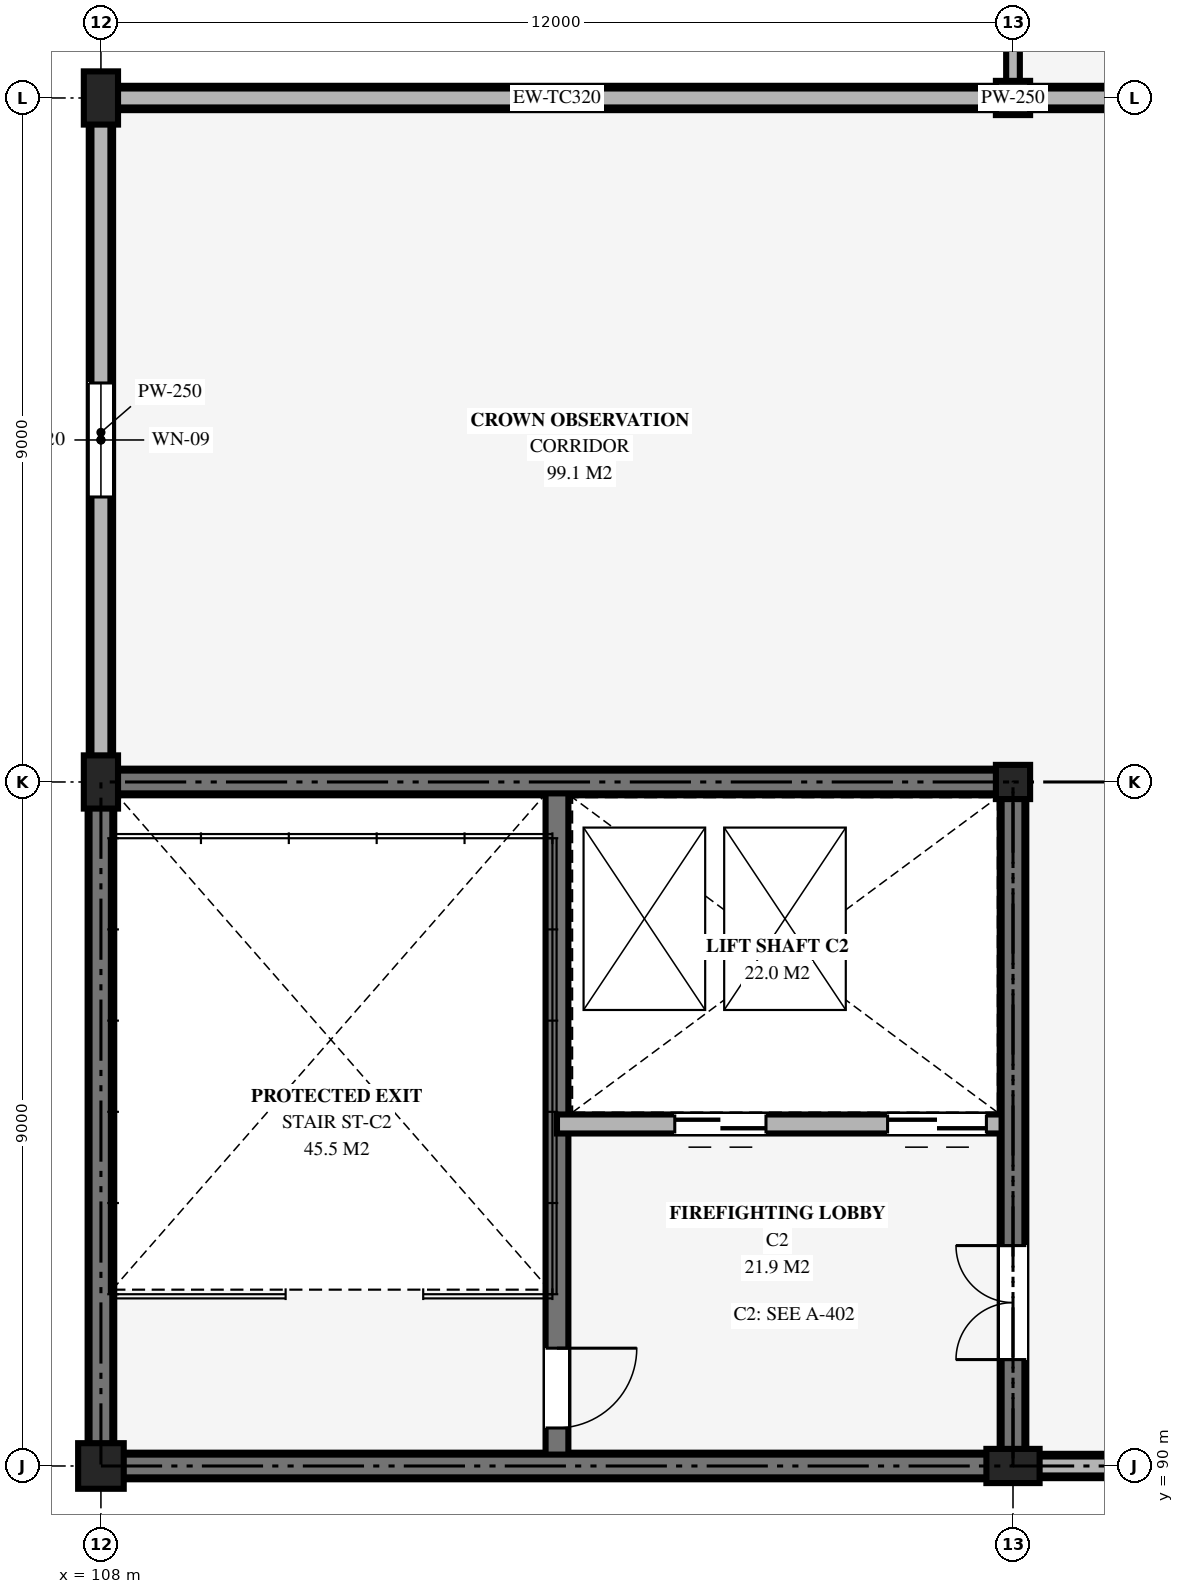
"""IFC4 building model, lengths in metres.
Left out: names, types, materials, properties, quantities, classifications, styles, units other than length and angle.
Written with IfcOpenShell. Run it as: python <this file> out.ifc"""

import sys

from ifc_helpers import new_model, si_unit, direction, frame, frame_2d, origin, origin_2d, place, context, subcontext, project, spatial, rectangle, circle, extrude, element, fill, save


model = new_model("IFC4")
c1 = context("Model", 3, precision=1e-05, world=origin(), true_north=direction((0.0, 1.0)))
c2 = subcontext(c1, "Body", "Model", "MODEL_VIEW")
j1 = project(units=[si_unit("LENGTHUNIT", "METRE"), si_unit("PLANEANGLEUNIT", "RADIAN")], contexts=[c1])
p1 = place(None, origin())
s1 = spatial("IfcSite", under=j1, at=p1, CompositionType="ELEMENT")
p2 = place(p1, origin())
s2 = spatial("IfcBuilding", under=s1, at=p2, CompositionType="ELEMENT")
p3 = place(p2, frame((0.0, 0.0, 23.7)))
s3 = spatial("IfcBuildingStorey", under=s2, at=p3, CompositionType="ELEMENT", Elevation=23.7)
p4 = place(p3, frame((108.0, 90.0, 0.0), z_axis=(0.0, 0.0, 1.0), x_axis=(1.0, 0.0, 0.0)))
e1 = element("IfcColumn", 1, at=p4, inside=s3, PredefinedType="COLUMN", context=c2, shape_type="SweptSolid", body=[
    extrude(circle(Radius=0.3, at=origin_2d()), origin(), (0.0, 0.0, 1.0), 4.04),
])
for number, where, z_axis, x_axis in (
    (2, (108.0, 99.0, 0.0), (0.0, 0.0, 1.0), (1.0, 0.0, 0.0)),
    (3, (108.0, 108.0, 0.0), (0.0, 0.0, 1.0), (1.0, 0.0, 0.0)),
    (4, (120.0, 90.0, 0.0), (0.0, 0.0, 1.0), (0.0, 1.0, 0.0)),
):
    element("IfcColumn", number, at=place(p3, frame(where, z_axis=z_axis, x_axis=x_axis)), inside=s3, PredefinedType="PILASTER", context=c2, shape_type="SweptSolid", body=[
        extrude(rectangle(XDim=0.45, YDim=0.7, at=origin_2d()), origin(), (0.0, 0.0, 1.0), 4.04),
    ])
for number, where, z_axis, x_axis in (
    (5, (120.0, 99.0, 0.0), (0.0, 0.0, 1.0), (1.0, 0.0, 0.0)),
    (6, (120.0, 108.0, 0.0), (0.0, 0.0, 1.0), (1.0, 0.0, 0.0)),
):
    element("IfcColumn", number, at=place(p3, frame(where, z_axis=z_axis, x_axis=x_axis)), inside=s3, PredefinedType="COLUMN", context=c2, shape_type="SweptSolid", body=[
        extrude(rectangle(XDim=0.45, YDim=0.45, at=origin_2d()), origin(), (0.0, 0.0, 1.0), 4.04),
    ])
p5 = place(p3, frame((131.5, 90.0, 0.0), z_axis=(0.0, 0.0, 1.0), x_axis=(-1.0, 0.0, 0.0)))
e7 = element("IfcWall", 7, at=p5, inside=s3, PredefinedType="SOLIDWALL", context=c2, shape_type="SweptSolid", body=[
    extrude(rectangle(XDim=11.15, YDim=0.32, at=frame_2d((5.575, 0.0))), origin(), (0.0, 0.0, 1.0), 3.98),
])
p6 = place(p5, frame((1.6, 0.0, 1.0)))
e8 = element("IfcOpeningElement", 8, at=p6, cuts=e7, PredefinedType="OPENING", context=c2, shape_type="SweptSolid", body=[
    extrude(rectangle(XDim=1.8, YDim=2.2, at=frame_2d((0.9, 1.1))), frame((0.0, 0.17, 0.0), z_axis=(0.0, -1.0, 0.0), x_axis=(1.0, 0.0, 0.0)), (0.0, 0.0, 1.0), 0.34),
])
p7 = place(p3, frame((108.0, 107.65, 0.0), z_axis=(0.0, 0.0, 1.0), x_axis=(0.0, -1.0, 0.0)))
e9 = element("IfcWall", 9, at=p7, inside=s3, PredefinedType="SOLIDWALL", context=c2, shape_type="SweptSolid", body=[
    extrude(rectangle(XDim=8.3, YDim=0.32, at=frame_2d((4.15, 0.0))), origin(), (0.0, 0.0, 1.0), 3.98),
])
p8 = place(p7, frame((3.4, 0.0, 1.0)))
e10 = element("IfcOpeningElement", 10, at=p8, cuts=e9, PredefinedType="OPENING", context=c2, shape_type="SweptSolid", body=[
    extrude(rectangle(XDim=1.5, YDim=1.8, at=frame_2d((0.75, 0.9))), frame((0.0, 0.17, 0.0), z_axis=(0.0, -1.0, 0.0), x_axis=(1.0, 0.0, 0.0)), (0.0, 0.0, 1.0), 0.34),
])
for number, where, z_axis, x_axis in (
    (11, (108.225, 108.0, 0.0), (0.0, 0.0, 1.0), (1.0, 0.0, 0.0)),
    (12, (120.225, 108.0, 0.0), (0.0, 0.0, 1.0), (1.0, 0.0, 0.0)),
):
    element("IfcWall", number, at=place(p3, frame(where, z_axis=z_axis, x_axis=x_axis)), inside=s3, PredefinedType="SOLIDWALL", context=c2, shape_type="SweptSolid", body=[
        extrude(rectangle(XDim=11.55, YDim=0.32, at=frame_2d((5.775, 0.0))), origin(), (0.0, 0.0, 1.0), 3.98),
    ])
p9 = place(p3, frame((120.0, 108.0, 0.0), z_axis=(0.0, 0.0, 1.0), x_axis=(0.0, 1.0, 0.0)))
e13 = element("IfcWall", 13, at=p9, inside=s3, PredefinedType="PARAPET", context=c2, shape_type="SweptSolid", body=[
    extrude(rectangle(XDim=18.0, YDim=0.18, at=frame_2d((9.0, 0.0))), origin(), (0.0, 0.0, 1.0), 1.15),
])
p10 = place(p3, frame((120.2, 90.0, 4.2), z_axis=(0.0, 0.0, 1.0), x_axis=(1.0, 0.0, 0.0)))
e14 = element("IfcWall", 14, at=p10, inside=s3, PredefinedType="PARAPET", context=c2, shape_type="SweptSolid", body=[
    extrude(rectangle(XDim=51.8, YDim=0.25, at=frame_2d((25.9, 0.0))), origin(), (0.0, 0.0, 1.0), 1.35),
])
p11 = place(p3, frame((132.0, 108.0, 4.2), z_axis=(0.0, 0.0, 1.0), x_axis=(-1.0, 0.0, 0.0)))
e15 = element("IfcWall", 15, at=p11, inside=s3, PredefinedType="PARAPET", context=c2, shape_type="SweptSolid", body=[
    extrude(rectangle(XDim=24.0, YDim=0.25, at=frame_2d((12.0, 0.0))), origin(), (0.0, 0.0, 1.0), 1.35),
])
p12 = place(p3, frame((108.0, 108.0, 4.2), z_axis=(0.0, 0.0, 1.0), x_axis=(0.0, -1.0, 0.0)))
e16 = element("IfcWall", 16, at=p12, inside=s3, PredefinedType="PARAPET", context=c2, shape_type="SweptSolid", body=[
    extrude(rectangle(XDim=8.8, YDim=0.25, at=frame_2d((4.4, 0.0))), origin(), (0.0, 0.0, 1.0), 1.35),
])
for number, where, z_axis, x_axis in (
    (17, (108.0, 90.0, 0.0), (0.0, 0.0, 1.0), (1.0, 0.0, 0.0)),
    (18, (108.0, 99.0, 0.0), (0.0, 0.0, 1.0), (1.0, 0.0, 0.0)),
):
    element("IfcWall", number, at=place(p3, frame(where, z_axis=z_axis, x_axis=x_axis)), inside=s3, PredefinedType="SHEAR", context=c2, shape_type="SweptSolid", body=[
        extrude(rectangle(XDim=12.0, YDim=0.35, at=frame_2d((6.0, 0.0))), origin(), (0.0, 0.0, 1.0), 3.98),
    ])
p13 = place(p3, frame((108.0, 90.0, 0.0), z_axis=(0.0, 0.0, 1.0), x_axis=(0.0, 1.0, 0.0)))
e19 = element("IfcWall", 19, at=p13, inside=s3, PredefinedType="SHEAR", context=c2, shape_type="SweptSolid", body=[
    extrude(rectangle(XDim=9.0, YDim=0.35, at=frame_2d((4.5, 0.0))), origin(), (0.0, 0.0, 1.0), 3.98),
])
p14 = place(p3, frame((120.0, 90.0, 0.0), z_axis=(0.0, 0.0, 1.0), x_axis=(0.0, 1.0, 0.0)))
e20 = element("IfcWall", 20, at=p14, inside=s3, PredefinedType="SHEAR", context=c2, shape_type="SweptSolid", body=[
    extrude(rectangle(XDim=9.0, YDim=0.35, at=frame_2d((4.5, 0.0))), origin(), (0.0, 0.0, 1.0), 3.98),
])
p15 = place(p14, frame((1.4, 0.0, 0.0)))
e21 = element("IfcOpeningElement", 21, at=p15, cuts=e20, PredefinedType="OPENING", context=c2, shape_type="SweptSolid", body=[
    extrude(rectangle(XDim=1.5, YDim=2.2, at=frame_2d((0.75, 1.1))), frame((0.0, 0.185, 0.0), z_axis=(0.0, -1.0, 0.0), x_axis=(1.0, 0.0, 0.0)), (0.0, 0.0, 1.0), 0.37),
])
p16 = place(p3, frame((114.0, 99.0, 0.0), z_axis=(0.0, 0.0, 1.0), x_axis=(0.0, -1.0, 0.0)))
e22 = element("IfcWall", 22, at=p16, inside=s3, PredefinedType="SHEAR", context=c2, shape_type="SweptSolid", body=[
    extrude(rectangle(XDim=9.0, YDim=0.3, at=frame_2d((4.5, 0.0))), origin(), (0.0, 0.0, 1.0), 3.98),
])
p17 = place(p16, frame((7.45, 0.0, 0.0)))
e23 = element("IfcOpeningElement", 23, at=p17, cuts=e22, PredefinedType="OPENING", context=c2, shape_type="SweptSolid", body=[
    extrude(rectangle(XDim=1.05, YDim=2.15, at=frame_2d((0.525, 1.075))), frame((0.0, 0.16, 0.0), z_axis=(0.0, -1.0, 0.0), x_axis=(1.0, 0.0, 0.0)), (0.0, 0.0, 1.0), 0.32),
])
p18 = place(p3, frame((120.0, 94.5, 0.0), z_axis=(0.0, 0.0, 1.0), x_axis=(-1.0, 0.0, 0.0)))
e24 = element("IfcWall", 24, at=p18, inside=s3, PredefinedType="SOLIDWALL", context=c2, shape_type="SweptSolid", body=[
    extrude(rectangle(XDim=6.0, YDim=0.25, at=frame_2d((3.0, 0.0))), origin(), (0.0, 0.0, 1.0), 3.25),
])
p19 = place(p18, frame((0.35, 0.0, 0.0)))
e25 = element("IfcOpeningElement", 25, at=p19, cuts=e24, PredefinedType="OPENING", context=c2, shape_type="SweptSolid", body=[
    extrude(rectangle(XDim=1.3, YDim=2.25, at=frame_2d((0.65, 1.125))), frame((0.0, 0.135, 0.0), z_axis=(0.0, -1.0, 0.0), x_axis=(1.0, 0.0, 0.0)), (0.0, 0.0, 1.0), 0.27),
])
p20 = place(p18, frame((3.25, 0.0, 0.0)))
e26 = element("IfcOpeningElement", 26, at=p20, cuts=e24, PredefinedType="OPENING", context=c2, shape_type="SweptSolid", body=[
    extrude(rectangle(XDim=1.2, YDim=2.2, at=frame_2d((0.6, 1.1))), frame((0.0, 0.135, 0.0), z_axis=(0.0, -1.0, 0.0), x_axis=(1.0, 0.0, 0.0)), (0.0, 0.0, 1.0), 0.27),
])
for number, where, z_axis, x_axis in (
    (27, (108.0, 90.0, 3.98), (0.0, 0.0, 1.0), (1.0, 0.0, 0.0)),
    (28, (108.0, 99.0, 3.98), (0.0, 0.0, 1.0), (1.0, 0.0, 0.0)),
):
    element("IfcWall", number, at=place(p3, frame(where, z_axis=z_axis, x_axis=x_axis)), inside=s3, PredefinedType="SHEAR", context=c2, shape_type="SweptSolid", body=[
        extrude(rectangle(XDim=12.0, YDim=0.3, at=frame_2d((6.0, 0.0))), origin(), (0.0, 0.0, 1.0), 1.84),
    ])
for number, where, z_axis, x_axis in (
    (29, (108.0, 90.0, 3.98), (0.0, 0.0, 1.0), (0.0, 1.0, 0.0)),
    (30, (120.0, 90.0, 3.98), (0.0, 0.0, 1.0), (0.0, 1.0, 0.0)),
):
    element("IfcWall", number, at=place(p3, frame(where, z_axis=z_axis, x_axis=x_axis)), inside=s3, PredefinedType="SHEAR", context=c2, shape_type="SweptSolid", body=[
        extrude(rectangle(XDim=9.0, YDim=0.3, at=frame_2d((4.5, 0.0))), origin(), (0.0, 0.0, 1.0), 1.84),
    ])
p21 = place(p8, origin())
e31 = element("IfcWindow", 31, at=p21, inside=s3, PartitioningType="SINGLE_PANEL", PredefinedType="WINDOW", context=c2, shape_type="SweptSolid", body=[
    extrude(rectangle(XDim=1.5, YDim=1.8, at=frame_2d((0.75, 0.9))), frame((0.0, 0.03, 0.0), z_axis=(0.0, -1.0, 0.0), x_axis=(1.0, 0.0, 0.0)), (0.0, 0.0, 1.0), 0.06),
])
fill(e10, e31)
p22 = place(p19, origin())
e32 = element("IfcDoor", 32, at=p22, inside=s3, OperationType="DOUBLE_DOOR_SLIDING", PredefinedType="USERDEFINED", context=c2, shape_type="SweptSolid", body=[
    extrude(rectangle(XDim=1.3, YDim=2.25, at=frame_2d((0.65, 1.125))), frame((0.0, 0.025, 0.0), z_axis=(0.0, -1.0, 0.0), x_axis=(1.0, 0.0, 0.0)), (0.0, 0.0, 1.0), 0.05),
])
fill(e25, e32)
p23 = place(p20, origin())
e33 = element("IfcDoor", 33, at=p23, inside=s3, OperationType="DOUBLE_DOOR_SLIDING", PredefinedType="USERDEFINED", context=c2, shape_type="SweptSolid", body=[
    extrude(rectangle(XDim=1.2, YDim=2.2, at=frame_2d((0.6, 1.1))), frame((0.0, 0.025, 0.0), z_axis=(0.0, -1.0, 0.0), x_axis=(1.0, 0.0, 0.0)), (0.0, 0.0, 1.0), 0.05),
])
fill(e26, e33)
p24 = place(p17, origin())
e34 = element("IfcDoor", 34, at=p24, inside=s3, OperationType="SINGLE_SWING_LEFT", PredefinedType="DOOR", context=c2, shape_type="SweptSolid", body=[
    extrude(rectangle(XDim=1.05, YDim=2.15, at=frame_2d((0.525, 1.075))), frame((0.0, 0.025, 0.0), z_axis=(0.0, -1.0, 0.0), x_axis=(1.0, 0.0, 0.0)), (0.0, 0.0, 1.0), 0.05),
])
fill(e23, e34)
p25 = place(p15, origin())
e35 = element("IfcDoor", 35, at=p25, inside=s3, OperationType="DOUBLE_DOOR_SINGLE_SWING", PredefinedType="DOOR", context=c2, shape_type="SweptSolid", body=[
    extrude(rectangle(XDim=1.5, YDim=2.2, at=frame_2d((0.75, 1.1))), frame((0.0, 0.025, 0.0), z_axis=(0.0, -1.0, 0.0), x_axis=(1.0, 0.0, 0.0)), (0.0, 0.0, 1.0), 0.05),
])
fill(e21, e35)
save(model, sys.argv[1])
